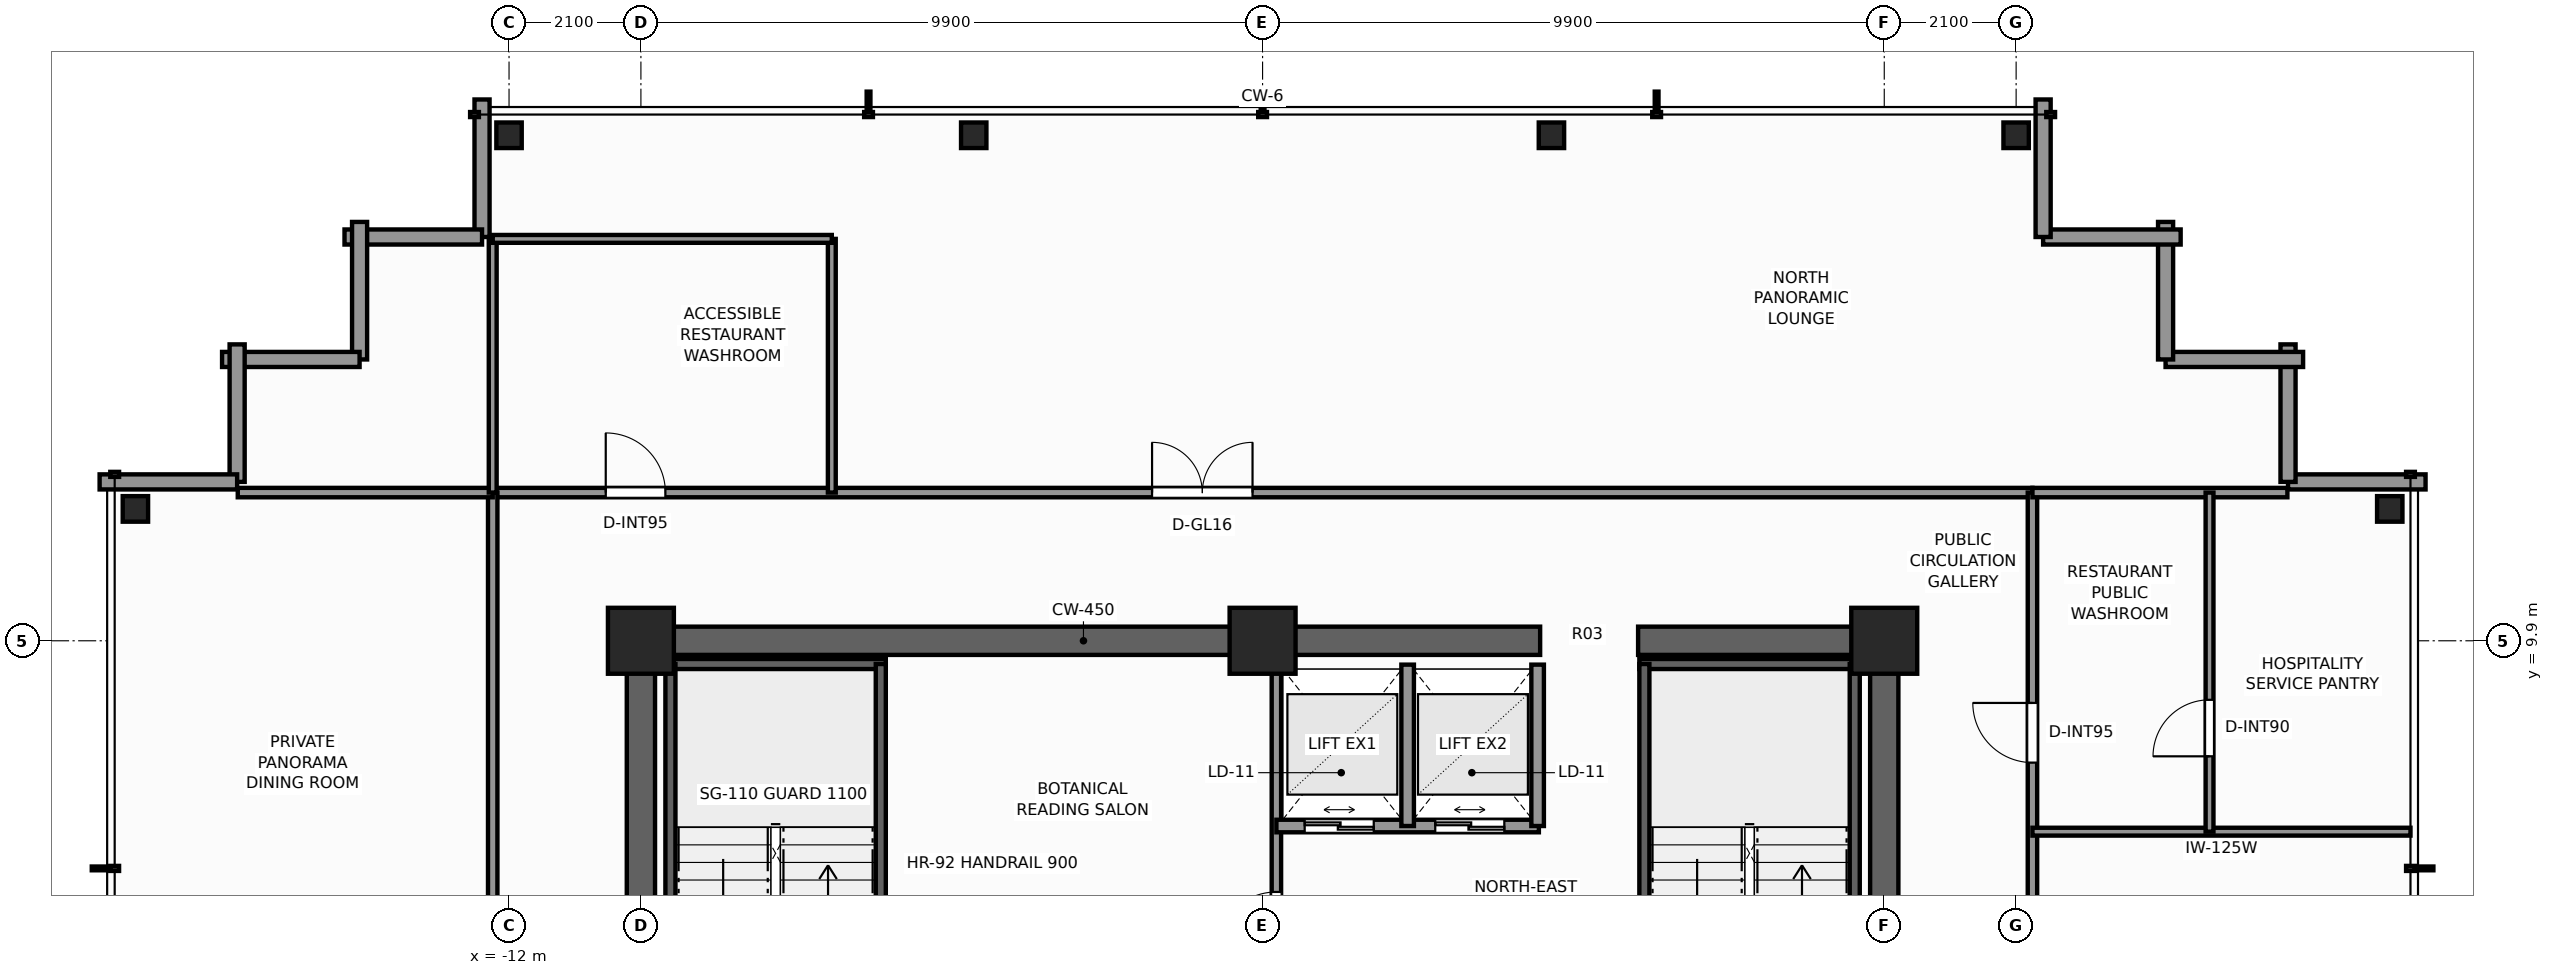
"""IFC4 building model, lengths in metres.
Left out: names, types, materials, properties, quantities, classifications, styles, units other than length and angle.
Written with IfcOpenShell. Run it as: python <this file> out.ifc"""

import sys

from ifc_helpers import new_model, si_unit, direction, frame, frame_2d, origin, origin_2d, place, context, subcontext, project, spatial, rectangle, i_section, extrude, element, fill, save


model = new_model("IFC4")
c1 = context("Model", 3, precision=1e-05, world=origin(), true_north=direction((0.0, 1.0)))
c2 = subcontext(c1, "Body", "Model", "MODEL_VIEW")
j1 = project(units=[si_unit("LENGTHUNIT", "METRE"), si_unit("PLANEANGLEUNIT", "RADIAN")], contexts=[c1])
p1 = place(None, origin())
s1 = spatial("IfcSite", under=j1, at=p1, CompositionType="ELEMENT")
p2 = place(p1, origin())
s2 = spatial("IfcBuilding", under=s1, at=p2, CompositionType="ELEMENT")
p3 = place(p2, frame((0.0, 0.0, 262.8)))
s3 = spatial("IfcBuildingStorey", under=s2, at=p3, CompositionType="ELEMENT", Elevation=262.8)
p4 = place(p3, frame((-10.125, 9.9, 0.0), z_axis=(0.0, 0.0, 1.0), x_axis=(1.0, 0.0, 0.0)))
e1 = element("IfcWall", 1, at=p4, inside=s3, PredefinedType="SHEAR", context=c2, shape_type="SweptSolid", body=[
    extrude(rectangle(XDim=14.545, YDim=0.45, at=frame_2d((7.272, 0.0))), origin(), (0.0, 0.0, 1.0), 4.6),
])
p5 = place(p3, frame((5.98, 9.9, 0.0), z_axis=(0.0, 0.0, 1.0), x_axis=(1.0, 0.0, 0.0)))
e2 = element("IfcWall", 2, at=p5, inside=s3, PredefinedType="SHEAR", context=c2, shape_type="SweptSolid", body=[
    extrude(rectangle(XDim=4.145, YDim=0.45, at=frame_2d((2.073, 0.0))), origin(), (0.0, 0.0, 1.0), 4.6),
])
p6 = place(p3, frame((-9.9, -3.7, 0.0), z_axis=(0.0, 0.0, 1.0), x_axis=(0.0, 1.0, 0.0)))
e3 = element("IfcWall", 3, at=p6, inside=s3, PredefinedType="SHEAR", context=c2, shape_type="SweptSolid", body=[
    extrude(rectangle(XDim=13.375, YDim=0.45, at=frame_2d((6.688, 0.0))), origin(), (0.0, 0.0, 1.0), 4.6),
])
p7 = place(p6, frame((0.35, 0.0, 0.0)))
e4 = element("IfcOpeningElement", 4, at=p7, cuts=e3, PredefinedType="OPENING", context=c2, shape_type="SweptSolid", body=[
    extrude(rectangle(XDim=1.1, YDim=2.2, at=frame_2d((0.55, 1.1))), frame((0.0, 0.235, 0.0), z_axis=(0.0, -1.0, 0.0), x_axis=(1.0, 0.0, 0.0)), (0.0, 0.0, 1.0), 0.47),
])
p8 = place(p3, frame((9.9, -3.7, 0.0), z_axis=(0.0, 0.0, 1.0), x_axis=(0.0, 1.0, 0.0)))
e5 = element("IfcWall", 5, at=p8, inside=s3, PredefinedType="SHEAR", context=c2, shape_type="SweptSolid", body=[
    extrude(rectangle(XDim=13.375, YDim=0.45, at=frame_2d((6.688, 0.0))), origin(), (0.0, 0.0, 1.0), 4.6),
])
p9 = place(p8, frame((0.35, 0.0, 0.0)))
e6 = element("IfcOpeningElement", 6, at=p9, cuts=e5, PredefinedType="OPENING", context=c2, shape_type="SweptSolid", body=[
    extrude(rectangle(XDim=1.1, YDim=2.2, at=frame_2d((0.55, 1.1))), frame((0.0, 0.235, 0.0), z_axis=(0.0, -1.0, 0.0), x_axis=(1.0, 0.0, 0.0)), (0.0, 0.0, 1.0), 0.47),
])
for number, where, z_axis, x_axis in (
    (7, (9.9, 9.9, 0.0), (0.0, 0.0, 1.0), (1.0, 0.0, 0.0)),
    (8, (-9.9, 9.9, 0.0), (0.0, 0.0, 1.0), (1.0, 0.0, 0.0)),
    (9, (0.0, 9.9, 0.0), (0.0, 0.0, 1.0), (1.0, 0.0, 0.0)),
):
    element("IfcColumn", number, at=place(p3, frame(where, z_axis=z_axis, x_axis=x_axis)), inside=s3, PredefinedType="COLUMN", context=c2, shape_type="SweptSolid", body=[
        extrude(rectangle(XDim=1.05, YDim=1.05, at=origin_2d()), origin(), (0.0, 0.0, 1.0), 4.6),
    ])
for number, where, z_axis, x_axis in (
    (10, (-12.0, 17.95, 0.0), (0.0, 0.0, 1.0), (1.0, 0.0, 0.0)),
    (11, (-4.6, 17.95, 0.0), (0.0, 0.0, 1.0), (1.0, 0.0, 0.0)),
    (12, (4.6, 17.95, 0.0), (0.0, 0.0, 1.0), (1.0, 0.0, 0.0)),
    (13, (12.0, 17.95, 0.0), (0.0, 0.0, 1.0), (1.0, 0.0, 0.0)),
    (14, (-17.95, 12.0, 0.0), (0.0, 0.0, 1.0), (1.0, 0.0, 0.0)),
    (15, (17.95, 12.0, 0.0), (0.0, 0.0, 1.0), (1.0, 0.0, 0.0)),
):
    element("IfcColumn", number, at=place(p3, frame(where, z_axis=z_axis, x_axis=x_axis)), inside=s3, PredefinedType="COLUMN", context=c2, shape_type="SweptSolid", body=[
        extrude(i_section(OverallWidth=0.404, OverallDepth=0.407, WebThickness=0.027, FlangeThickness=0.044, FilletRadius=0.025, at=origin_2d()), origin(), (0.0, 0.0, 1.0), 4.6),
    ])
p10 = place(p3, frame((16.33, 12.43, 0.0), z_axis=(0.0, 0.0, 1.0), x_axis=(1.0, 0.0, 0.0)))
e16 = element("IfcWall", 16, at=p10, inside=s3, PredefinedType="STANDARD", context=c2, shape_type="SweptSolid", body=[
    extrude(rectangle(XDim=2.19, YDim=0.24, at=frame_2d((1.095, 0.0))), origin(), (0.0, 0.0, 1.0), 3.703),
])
for number, where, z_axis, x_axis in (
    (17, (16.33, 14.62, 0.0), (0.0, 0.0, 1.0), (0.0, -1.0, 0.0)),
    (18, (14.38, 14.38, 0.0), (0.0, 0.0, 1.0), (1.0, 0.0, 0.0)),
    (19, (14.38, 16.57, 0.0), (0.0, 0.0, 1.0), (0.0, -1.0, 0.0)),
    (20, (12.43, 16.33, 0.0), (0.0, 0.0, 1.0), (1.0, 0.0, 0.0)),
):
    element("IfcWall", number, at=place(p3, frame(where, z_axis=z_axis, x_axis=x_axis)), inside=s3, PredefinedType="STANDARD", context=c2, shape_type="SweptSolid", body=[
        extrude(rectangle(XDim=2.19, YDim=0.24, at=frame_2d((1.095, 0.0))), origin(), (0.0, 0.0, 1.0), 3.703),
    ])
for number, where, z_axis, x_axis in (
    (21, (12.43, 18.52, 0.0), (0.0, 0.0, 1.0), (0.0, -1.0, 0.0)),
    (22, (-12.43, 16.33, 0.0), (0.0, 0.0, 1.0), (0.0, 1.0, 0.0)),
):
    element("IfcWall", number, at=place(p3, frame(where, z_axis=z_axis, x_axis=x_axis)), inside=s3, PredefinedType="STANDARD", context=c2, shape_type="SweptSolid", body=[
        extrude(rectangle(XDim=2.19, YDim=0.24, at=frame_2d((1.095, 0.0))), origin(), (0.0, 0.0, 1.0), 3.703),
    ])
for number, where, z_axis, x_axis in (
    (23, (-14.62, 16.33, 0.0), (0.0, 0.0, 1.0), (1.0, 0.0, 0.0)),
    (24, (-14.38, 14.38, 0.0), (0.0, 0.0, 1.0), (0.0, 1.0, 0.0)),
    (25, (-16.57, 14.38, 0.0), (0.0, 0.0, 1.0), (1.0, 0.0, 0.0)),
    (26, (-16.33, 12.43, 0.0), (0.0, 0.0, 1.0), (0.0, 1.0, 0.0)),
):
    element("IfcWall", number, at=place(p3, frame(where, z_axis=z_axis, x_axis=x_axis)), inside=s3, PredefinedType="STANDARD", context=c2, shape_type="SweptSolid", body=[
        extrude(rectangle(XDim=2.19, YDim=0.24, at=frame_2d((1.095, 0.0))), origin(), (0.0, 0.0, 1.0), 3.703),
    ])
p11 = place(p3, frame((-18.52, 12.43, 0.0), z_axis=(0.0, 0.0, 1.0), x_axis=(1.0, 0.0, 0.0)))
e27 = element("IfcWall", 27, at=p11, inside=s3, PredefinedType="STANDARD", context=c2, shape_type="SweptSolid", body=[
    extrude(rectangle(XDim=2.19, YDim=0.24, at=frame_2d((1.095, 0.0))), origin(), (0.0, 0.0, 1.0), 3.703),
])
p12 = place(p3, frame((-9.52, 9.53, 0.0), z_axis=(0.0, 0.0, 1.0), x_axis=(1.0, 0.0, 0.0)))
e28 = element("IfcWall", 28, at=p12, inside=s3, PredefinedType="SHEAR", context=c2, shape_type="SweptSolid", body=[
    extrude(rectangle(XDim=3.52, YDim=0.16, at=frame_2d((1.76, 0.0))), origin(), (0.0, 0.0, 1.0), 4.6),
])
for number, where, z_axis, x_axis in (
    (29, (-9.43, 1.97, 0.0), (0.0, 0.0, 1.0), (0.0, 1.0, 0.0)),
    (30, (-6.08, 1.97, 0.0), (0.0, 0.0, 1.0), (0.0, 1.0, 0.0)),
):
    element("IfcWall", number, at=place(p3, frame(where, z_axis=z_axis, x_axis=x_axis)), inside=s3, PredefinedType="SHEAR", context=c2, shape_type="SweptSolid", body=[
        extrude(rectangle(XDim=7.56, YDim=0.16, at=frame_2d((3.78, 0.0))), origin(), (0.0, 0.0, 1.0), 4.6),
    ])
p13 = place(p3, frame((6.0, 9.53, 0.0), z_axis=(0.0, 0.0, 1.0), x_axis=(1.0, 0.0, 0.0)))
e31 = element("IfcWall", 31, at=p13, inside=s3, PredefinedType="SHEAR", context=c2, shape_type="SweptSolid", body=[
    extrude(rectangle(XDim=3.52, YDim=0.16, at=frame_2d((1.76, 0.0))), origin(), (0.0, 0.0, 1.0), 4.6),
])
for number, where, z_axis, x_axis in (
    (32, (6.08, 1.97, 0.0), (0.0, 0.0, 1.0), (0.0, 1.0, 0.0)),
    (33, (9.43, 1.97, 0.0), (0.0, 0.0, 1.0), (0.0, 1.0, 0.0)),
):
    element("IfcWall", number, at=place(p3, frame(where, z_axis=z_axis, x_axis=x_axis)), inside=s3, PredefinedType="SHEAR", context=c2, shape_type="SweptSolid", body=[
        extrude(rectangle(XDim=7.56, YDim=0.16, at=frame_2d((3.78, 0.0))), origin(), (0.0, 0.0, 1.0), 4.6),
    ])
p14 = place(p3, frame((0.22, 4.3, 0.0), z_axis=(0.0, 0.0, 1.0), x_axis=(0.0, 1.0, 0.0)))
e34 = element("IfcWall", 34, at=p14, inside=s3, PredefinedType="PARTITIONING", context=c2, shape_type="SweptSolid", body=[
    extrude(rectangle(XDim=5.22, YDim=0.15, at=frame_2d((2.61, 0.0))), origin(), (0.0, 0.0, 1.0), 4.32),
])
p15 = place(p14, frame((0.65, 0.0, 0.0)))
e35 = element("IfcOpeningElement", 35, at=p15, cuts=e34, PredefinedType="OPENING", context=c2, shape_type="SweptSolid", body=[
    extrude(rectangle(XDim=0.95, YDim=2.06, at=frame_2d((0.475, 1.03))), frame((0.0, 0.085, 0.0), z_axis=(0.0, -1.0, 0.0), x_axis=(1.0, 0.0, 0.0)), (0.0, 0.0, 1.0), 0.17),
])
p16 = place(p3, frame((0.22, 6.95, 0.0), z_axis=(0.0, 0.0, 1.0), x_axis=(1.0, 0.0, 0.0)))
e36 = element("IfcWall", 36, at=p16, inside=s3, PredefinedType="SOLIDWALL", context=c2, shape_type="SweptSolid", body=[
    extrude(rectangle(XDim=4.18, YDim=0.2, at=frame_2d((2.09, 0.0))), origin(), (0.0, 0.0, 1.0), 4.32),
])
p17 = place(p16, frame((0.45, 0.0, 0.0)))
e37 = element("IfcOpeningElement", 37, at=p17, cuts=e36, PredefinedType="OPENING", context=c2, shape_type="SweptSolid", body=[
    extrude(rectangle(XDim=1.1, YDim=2.2, at=frame_2d((0.55, 1.1))), frame((0.0, 0.11, 0.0), z_axis=(0.0, -1.0, 0.0), x_axis=(1.0, 0.0, 0.0)), (0.0, 0.0, 1.0), 0.22),
])
p18 = place(p16, frame((2.53, 0.0, 0.0)))
e38 = element("IfcOpeningElement", 38, at=p18, cuts=e36, PredefinedType="OPENING", context=c2, shape_type="SweptSolid", body=[
    extrude(rectangle(XDim=1.1, YDim=2.2, at=frame_2d((0.55, 1.1))), frame((0.0, 0.11, 0.0), z_axis=(0.0, -1.0, 0.0), x_axis=(1.0, 0.0, 0.0)), (0.0, 0.0, 1.0), 0.22),
])
for number, where, z_axis, x_axis in (
    (39, (4.38, 6.95, 0.0), (0.0, 0.0, 1.0), (0.0, 1.0, 0.0)),
    (40, (2.31, 6.95, 0.0), (0.0, 0.0, 1.0), (0.0, 1.0, 0.0)),
):
    element("IfcWall", number, at=place(p3, frame(where, z_axis=z_axis, x_axis=x_axis)), inside=s3, PredefinedType="SOLIDWALL", context=c2, shape_type="SweptSolid", body=[
        extrude(rectangle(XDim=2.57, YDim=0.2, at=frame_2d((1.285, 0.0))), origin(), (0.0, 0.0, 1.0), 4.32),
    ])
p19 = place(p3, frame((-12.26, 12.26, 0.0), z_axis=(0.0, 0.0, 1.0), x_axis=(1.0, 0.0, 0.0)))
e41 = element("IfcWall", 41, at=p19, inside=s3, PredefinedType="PARTITIONING", context=c2, shape_type="SweptSolid", body=[
    extrude(rectangle(XDim=24.52, YDim=0.15, at=frame_2d((12.26, 0.0))), origin(), (0.0, 0.0, 1.0), 3.609),
])
p20 = place(p19, frame((1.8, 0.0, 0.0)))
e42 = element("IfcOpeningElement", 42, at=p20, cuts=e41, PredefinedType="OPENING", context=c2, shape_type="SweptSolid", body=[
    extrude(rectangle(XDim=0.95, YDim=2.06, at=frame_2d((0.475, 1.03))), frame((0.0, 0.085, 0.0), z_axis=(0.0, -1.0, 0.0), x_axis=(1.0, 0.0, 0.0)), (0.0, 0.0, 1.0), 0.17),
])
p21 = place(p19, frame((10.5, 0.0, 0.0)))
e43 = element("IfcOpeningElement", 43, at=p21, cuts=e41, PredefinedType="OPENING", context=c2, shape_type="SweptSolid", body=[
    extrude(rectangle(XDim=1.6, YDim=2.3, at=frame_2d((0.8, 1.15))), frame((0.0, 0.085, 0.0), z_axis=(0.0, -1.0, 0.0), x_axis=(1.0, 0.0, 0.0)), (0.0, 0.0, 1.0), 0.17),
])
p22 = place(p3, frame((-12.26, -12.26, 0.0), z_axis=(0.0, 0.0, 1.0), x_axis=(0.0, 1.0, 0.0)))
e44 = element("IfcWall", 44, at=p22, inside=s3, PredefinedType="PARTITIONING", context=c2, shape_type="SweptSolid", body=[
    extrude(rectangle(XDim=24.52, YDim=0.15, at=frame_2d((12.26, 0.0))), origin(), (0.0, 0.0, 1.0), 3.609),
])
p23 = place(p22, frame((11.5, 0.0, 0.0)))
e45 = element("IfcOpeningElement", 45, at=p23, cuts=e44, PredefinedType="OPENING", context=c2, shape_type="SweptSolid", body=[
    extrude(rectangle(XDim=1.2, YDim=2.2, at=frame_2d((0.6, 1.1))), frame((0.0, 0.085, 0.0), z_axis=(0.0, -1.0, 0.0), x_axis=(1.0, 0.0, 0.0)), (0.0, 0.0, 1.0), 0.17),
])
p24 = place(p3, frame((12.26, -12.26, 0.0), z_axis=(0.0, 0.0, 1.0), x_axis=(0.0, 1.0, 0.0)))
e46 = element("IfcWall", 46, at=p24, inside=s3, PredefinedType="PARTITIONING", context=c2, shape_type="SweptSolid", body=[
    extrude(rectangle(XDim=24.52, YDim=0.15, at=frame_2d((12.26, 0.0))), origin(), (0.0, 0.0, 1.0), 3.609),
])
p25 = place(p24, frame((3.4, 0.0, 0.0)))
e47 = element("IfcOpeningElement", 47, at=p25, cuts=e46, PredefinedType="OPENING", context=c2, shape_type="SweptSolid", body=[
    extrude(rectangle(XDim=0.95, YDim=2.06, at=frame_2d((0.475, 1.03))), frame((0.0, 0.085, 0.0), z_axis=(0.0, -1.0, 0.0), x_axis=(1.0, 0.0, 0.0)), (0.0, 0.0, 1.0), 0.17),
])
p26 = place(p24, frame((20.22, 0.0, 0.0)))
e48 = element("IfcOpeningElement", 48, at=p26, cuts=e46, PredefinedType="OPENING", context=c2, shape_type="SweptSolid", body=[
    extrude(rectangle(XDim=0.95, YDim=2.06, at=frame_2d((0.475, 1.03))), frame((0.0, 0.085, 0.0), z_axis=(0.0, -1.0, 0.0), x_axis=(1.0, 0.0, 0.0)), (0.0, 0.0, 1.0), 0.17),
])
for number, where, z_axis, x_axis in (
    (49, (-16.32, 12.26, 0.0), (0.0, 0.0, 1.0), (1.0, 0.0, 0.0)),
    (50, (12.26, 12.26, 0.0), (0.0, 0.0, 1.0), (1.0, 0.0, 0.0)),
):
    element("IfcWall", number, at=place(p3, frame(where, z_axis=z_axis, x_axis=x_axis)), inside=s3, PredefinedType="PARTITIONING", context=c2, shape_type="SweptSolid", body=[
        extrude(rectangle(XDim=4.06, YDim=0.15, at=frame_2d((2.03, 0.0))), origin(), (0.0, 0.0, 1.0), 4.32),
    ])
p27 = place(p3, frame((12.26, 6.86, 0.0), z_axis=(0.0, 0.0, 1.0), x_axis=(1.0, 0.0, 0.0)))
e51 = element("IfcWall", 51, at=p27, inside=s3, PredefinedType="PARTITIONING", context=c2, shape_type="SweptSolid", body=[
    extrude(rectangle(XDim=6.02, YDim=0.125, at=frame_2d((3.01, 0.0))), origin(), (0.0, 0.0, 1.0), 3.693),
])
p28 = place(p3, frame((15.08, 6.86, 0.0), z_axis=(0.0, 0.0, 1.0), x_axis=(0.0, 1.0, 0.0)))
e52 = element("IfcWall", 52, at=p28, inside=s3, PredefinedType="PARTITIONING", context=c2, shape_type="SweptSolid", body=[
    extrude(rectangle(XDim=5.4, YDim=0.125, at=frame_2d((2.7, 0.0))), origin(), (0.0, 0.0, 1.0), 3.609),
])
p29 = place(p28, frame((1.2, 0.0, 0.0)))
e53 = element("IfcOpeningElement", 53, at=p29, cuts=e52, PredefinedType="OPENING", context=c2, shape_type="SweptSolid", body=[
    extrude(rectangle(XDim=0.9, YDim=2.06, at=frame_2d((0.45, 1.03))), frame((0.0, 0.073, 0.0), z_axis=(0.0, -1.0, 0.0), x_axis=(1.0, 0.0, 0.0)), (0.0, 0.0, 1.0), 0.145),
])
for number, where, z_axis, x_axis in (
    (54, (-12.26, 12.26, 0.0), (0.0, 0.0, 1.0), (0.0, 1.0, 0.0)),
    (55, (-6.86, 12.26, 0.0), (0.0, 0.0, 1.0), (0.0, 1.0, 0.0)),
):
    element("IfcWall", number, at=place(p3, frame(where, z_axis=z_axis, x_axis=x_axis)), inside=s3, PredefinedType="PARTITIONING", context=c2, shape_type="SweptSolid", body=[
        extrude(rectangle(XDim=4.04, YDim=0.125, at=frame_2d((2.02, 0.0))), origin(), (0.0, 0.0, 1.0), 4.32),
    ])
p30 = place(p3, frame((-12.26, 16.3, 0.0), z_axis=(0.0, 0.0, 1.0), x_axis=(1.0, 0.0, 0.0)))
e56 = element("IfcWall", 56, at=p30, inside=s3, PredefinedType="PARTITIONING", context=c2, shape_type="SweptSolid", body=[
    extrude(rectangle(XDim=5.4, YDim=0.125, at=frame_2d((2.7, 0.0))), origin(), (0.0, 0.0, 1.0), 3.609),
])
p31 = place(p15, origin())
e57 = element("IfcDoor", 57, at=p31, inside=s3, OperationType="SINGLE_SWING_LEFT", PredefinedType="DOOR", context=c2, shape_type="SweptSolid", body=[
    extrude(rectangle(XDim=0.95, YDim=2.06, at=frame_2d((0.475, 1.03))), frame((0.0, 0.025, 0.0), z_axis=(0.0, -1.0, 0.0), x_axis=(1.0, 0.0, 0.0)), (0.0, 0.0, 1.0), 0.05),
])
fill(e35, e57)
p32 = place(p17, origin())
e58 = element("IfcDoor", 58, at=p32, inside=s3, OperationType="DOUBLE_DOOR_SLIDING", PredefinedType="DOOR", context=c2, shape_type="SweptSolid", body=[
    extrude(rectangle(XDim=1.1, YDim=2.2, at=frame_2d((0.55, 1.1))), frame((0.0, 0.025, 0.0), z_axis=(0.0, -1.0, 0.0), x_axis=(1.0, 0.0, 0.0)), (0.0, 0.0, 1.0), 0.05),
])
fill(e37, e58)
p33 = place(p18, origin())
e59 = element("IfcDoor", 59, at=p33, inside=s3, OperationType="DOUBLE_DOOR_SLIDING", PredefinedType="DOOR", context=c2, shape_type="SweptSolid", body=[
    extrude(rectangle(XDim=1.1, YDim=2.2, at=frame_2d((0.55, 1.1))), frame((0.0, 0.025, 0.0), z_axis=(0.0, -1.0, 0.0), x_axis=(1.0, 0.0, 0.0)), (0.0, 0.0, 1.0), 0.05),
])
fill(e38, e59)
p34 = place(p26, origin())
e60 = element("IfcDoor", 60, at=p34, inside=s3, OperationType="SINGLE_SWING_RIGHT", PredefinedType="DOOR", context=c2, shape_type="SweptSolid", body=[
    extrude(rectangle(XDim=0.95, YDim=2.06, at=frame_2d((0.475, 1.03))), frame((0.0, 0.025, 0.0), z_axis=(0.0, -1.0, 0.0), x_axis=(1.0, 0.0, 0.0)), (0.0, 0.0, 1.0), 0.05),
])
fill(e48, e60)
p35 = place(p29, origin())
e61 = element("IfcDoor", 61, at=p35, inside=s3, OperationType="SINGLE_SWING_LEFT", PredefinedType="DOOR", context=c2, shape_type="SweptSolid", body=[
    extrude(rectangle(XDim=0.9, YDim=2.06, at=frame_2d((0.45, 1.03))), frame((0.0, 0.025, 0.0), z_axis=(0.0, -1.0, 0.0), x_axis=(1.0, 0.0, 0.0)), (0.0, 0.0, 1.0), 0.05),
])
fill(e53, e61)
p36 = place(p20, origin())
e62 = element("IfcDoor", 62, at=p36, inside=s3, OperationType="SINGLE_SWING_LEFT", PredefinedType="DOOR", context=c2, shape_type="SweptSolid", body=[
    extrude(rectangle(XDim=0.95, YDim=2.06, at=frame_2d((0.475, 1.03))), frame((0.0, 0.025, 0.0), z_axis=(0.0, -1.0, 0.0), x_axis=(1.0, 0.0, 0.0)), (0.0, 0.0, 1.0), 0.05),
])
fill(e42, e62)
p37 = place(p21, origin())
e63 = element("IfcDoor", 63, at=p37, inside=s3, OperationType="DOUBLE_DOOR_SINGLE_SWING", PredefinedType="DOOR", context=c2, shape_type="SweptSolid", body=[
    extrude(rectangle(XDim=1.6, YDim=2.3, at=frame_2d((0.8, 1.15))), frame((0.0, 0.025, 0.0), z_axis=(0.0, -1.0, 0.0), x_axis=(1.0, 0.0, 0.0)), (0.0, 0.0, 1.0), 0.05),
])
fill(e43, e63)
save(model, sys.argv[1])
